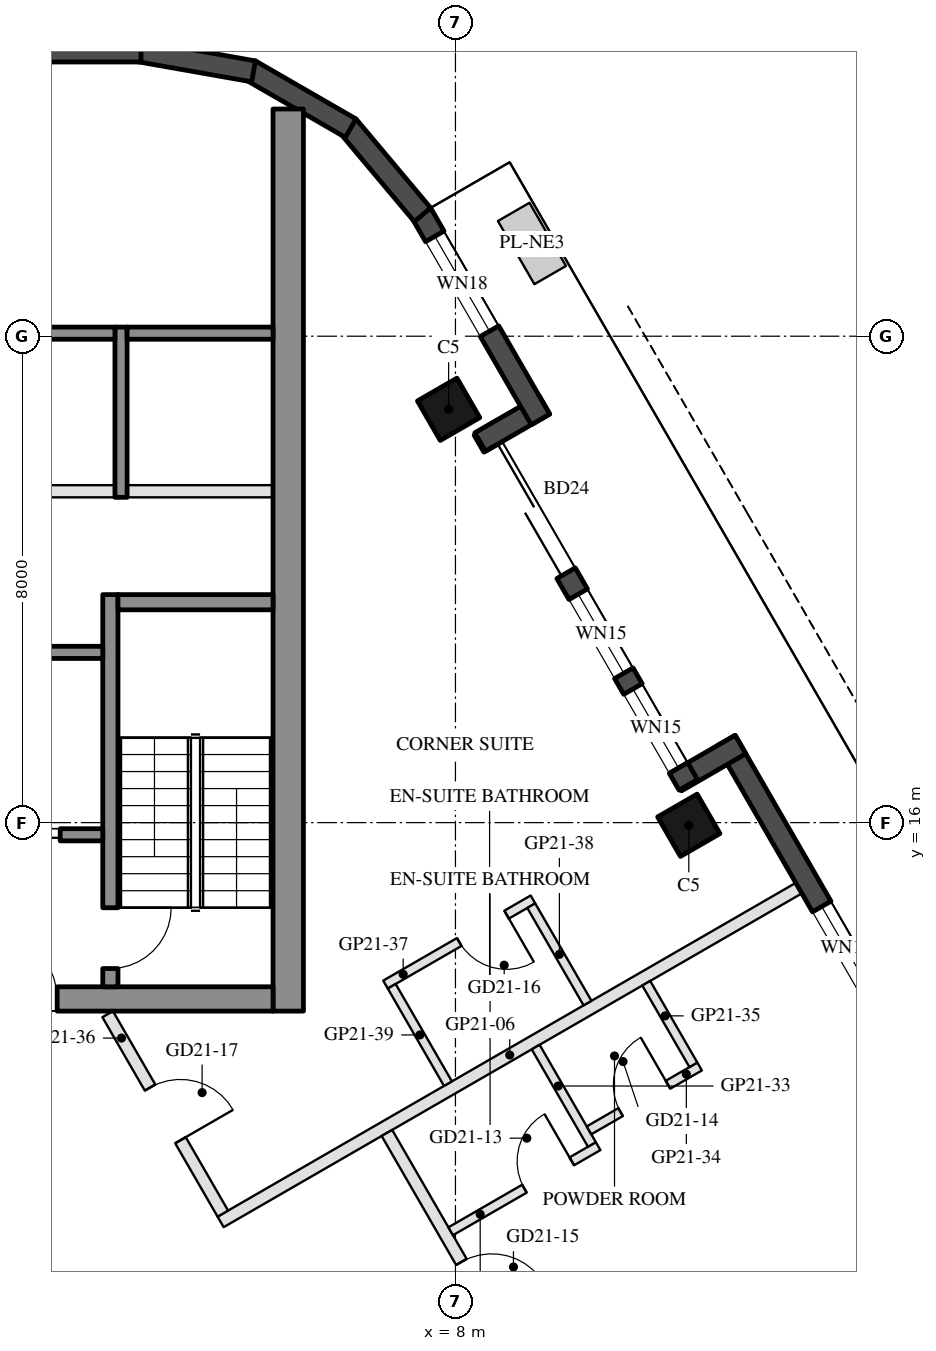
"""IFC4 building model, lengths in metres.
Left out: names, types, materials, properties, quantities, classifications, styles, units other than length and angle.
Written with IfcOpenShell. Run it as: python <this file> out.ifc"""

import sys

from ifc_helpers import new_model, si_unit, direction, frame, frame_2d, origin, origin_2d, place, context, subcontext, project, spatial, rectangle, hollow_rectangle, extrude, element, fill, save


model = new_model("IFC4")
c1 = context("Model", 3, precision=1e-05, world=origin(), true_north=direction((0.0, 1.0)))
c2 = subcontext(c1, "Body", "Model", "MODEL_VIEW")
j1 = project(units=[si_unit("LENGTHUNIT", "METRE"), si_unit("PLANEANGLEUNIT", "RADIAN")], contexts=[c1])
p1 = place(None, origin())
s1 = spatial("IfcSite", under=j1, at=p1, CompositionType="ELEMENT")
p2 = place(p1, origin())
s2 = spatial("IfcBuilding", under=s1, at=p2, CompositionType="ELEMENT")
p3 = place(p2, frame((0.0, 0.0, 220.6)))
s3 = spatial("IfcBuildingStorey", under=s2, at=p3, CompositionType="ELEMENT", Elevation=220.6)
for number, where, z_axis, x_axis in (
    (1, (11.838, 15.957, 0.0), (0.0, 0.0, 1.0), (-0.5, 0.866, 0.0)),
    (2, (7.888, 22.798, 0.0), (0.0, 0.0, 1.0), (-0.5, 0.866, 0.0)),
):
    element("IfcColumn", number, at=place(p3, frame(where, z_axis=z_axis, x_axis=x_axis)), inside=s3, PredefinedType="COLUMN", context=c2, shape_type="SweptSolid", body=[
        extrude(hollow_rectangle(XDim=0.75, YDim=0.75, WallThickness=0.035, at=origin_2d()), origin(), (0.0, 0.0, 1.0), 3.7),
    ])
p4 = place(p3, frame((17.299, 8.948, 0.0), z_axis=(0.0, 0.0, 1.0), x_axis=(-0.500010041276, 0.866019606374, 0.0)))
e3 = element("IfcWall", 3, at=p4, inside=s3, PredefinedType="SOLIDWALL", context=c2, shape_type="SweptSolid", body=[
    extrude(rectangle(XDim=9.7, YDim=0.35, at=frame_2d((4.85, 0.0))), origin(), (0.0, 0.0, 1.0), 3.55),
])
p5 = place(p4, frame((1.625, 0.0, 0.3)))
e4 = element("IfcOpeningElement", 4, at=p5, cuts=e3, PredefinedType="OPENING", context=c2, shape_type="SweptSolid", body=[
    extrude(rectangle(XDim=2.6, YDim=2.65, at=frame_2d((1.3, 1.325))), frame((0.0, 0.185, 0.0), z_axis=(0.0, -1.0, 0.0), x_axis=(1.0, 0.0, 0.0)), (0.0, 0.0, 1.0), 0.37),
])
p6 = place(p4, frame((4.949, 0.0, 0.3)))
e5 = element("IfcOpeningElement", 5, at=p6, cuts=e3, PredefinedType="OPENING", context=c2, shape_type="SweptSolid", body=[
    extrude(rectangle(XDim=1.6, YDim=2.65, at=frame_2d((0.8, 1.325))), frame((0.0, 0.185, 0.0), z_axis=(0.0, -1.0, 0.0), x_axis=(1.0, 0.0, 0.0)), (0.0, 0.0, 1.0), 0.37),
])
p7 = place(p3, frame((12.688, 17.284, 0.0), z_axis=(0.0, 0.0, 1.0), x_axis=(-0.865955602162, -0.500120880472, 0.0)))
e6 = element("IfcWall", 6, at=p7, inside=s3, PredefinedType="SOLIDWALL", context=c2, shape_type="SweptSolid", body=[
    extrude(rectangle(XDim=1.22, YDim=0.35, at=frame_2d((0.61, 0.0))), origin(), (0.0, 0.0, 1.0), 3.55),
])
p8 = place(p3, frame((11.829, 16.621, 0.0), z_axis=(0.0, 0.0, 1.0), x_axis=(-0.500003597184, 0.866023326939, 0.0)))
e7 = element("IfcWall", 7, at=p8, inside=s3, PredefinedType="SOLIDWALL", context=c2, shape_type="SweptSolid", body=[
    extrude(rectangle(XDim=6.74, YDim=0.35, at=frame_2d((3.37, 0.0))), origin(), (0.0, 0.0, 1.0), 3.55),
])
p9 = place(p8, frame((4.02, 0.0, 0.0)))
e8 = element("IfcOpeningElement", 8, at=p9, cuts=e7, PredefinedType="OPENING", context=c2, shape_type="SweptSolid", body=[
    extrude(rectangle(XDim=2.4, YDim=2.4, at=frame_2d((1.2, 1.2))), frame((0.0, 0.185, 0.0), z_axis=(0.0, -1.0, 0.0), x_axis=(1.0, 0.0, 0.0)), (0.0, 0.0, 1.0), 0.37),
])
p10 = place(p8, frame((0.32, 0.0, 0.3)))
e9 = element("IfcOpeningElement", 9, at=p10, cuts=e7, PredefinedType="OPENING", context=c2, shape_type="SweptSolid", body=[
    extrude(rectangle(XDim=1.5, YDim=2.65, at=frame_2d((0.75, 1.325))), frame((0.0, 0.185, 0.0), z_axis=(0.0, -1.0, 0.0), x_axis=(1.0, 0.0, 0.0)), (0.0, 0.0, 1.0), 0.37),
])
p11 = place(p8, frame((2.12, 0.0, 0.3)))
e10 = element("IfcOpeningElement", 10, at=p11, cuts=e7, PredefinedType="OPENING", context=c2, shape_type="SweptSolid", body=[
    extrude(rectangle(XDim=1.5, YDim=2.65, at=frame_2d((0.75, 1.325))), frame((0.0, 0.185, 0.0), z_axis=(0.0, -1.0, 0.0), x_axis=(1.0, 0.0, 0.0)), (0.0, 0.0, 1.0), 0.37),
])
p12 = place(p3, frame((8.406, 22.26, 0.0), z_axis=(0.0, 0.0, 1.0), x_axis=(0.865955602162, 0.500120880472, 0.0)))
e11 = element("IfcWall", 11, at=p12, inside=s3, PredefinedType="SOLIDWALL", context=c2, shape_type="SweptSolid", body=[
    extrude(rectangle(XDim=1.22, YDim=0.35, at=frame_2d((0.61, 0.0))), origin(), (0.0, 0.0, 1.0), 3.55),
])
p13 = place(p3, frame((9.398, 22.631, 0.0), z_axis=(0.0, 0.0, 1.0), x_axis=(-0.499954521343, 0.866051659307, 0.0)))
e12 = element("IfcWall", 12, at=p13, inside=s3, PredefinedType="SOLIDWALL", context=c2, shape_type="SweptSolid", body=[
    extrude(rectangle(XDim=3.916, YDim=0.35, at=frame_2d((1.958, 0.0))), origin(), (0.0, 0.0, 1.0), 3.55),
])
p14 = place(p13, frame((1.676, 0.0, 0.3)))
e13 = element("IfcOpeningElement", 13, at=p14, cuts=e12, PredefinedType="OPENING", context=c2, shape_type="SweptSolid", body=[
    extrude(rectangle(XDim=1.8, YDim=2.65, at=frame_2d((0.9, 1.325))), frame((0.0, 0.185, 0.0), z_axis=(0.0, -1.0, 0.0), x_axis=(1.0, 0.0, 0.0)), (0.0, 0.0, 1.0), 0.37),
])
p15 = place(p3, frame((7.458, 25.998, 0.0), z_axis=(0.0, 0.0, 1.0), x_axis=(-0.642808304945, 0.766027077259, 0.0)))
e14 = element("IfcWall", 14, at=p15, inside=s3, PredefinedType="SOLIDWALL", context=c2, shape_type="SweptSolid", body=[
    extrude(rectangle(XDim=1.91, YDim=0.35, at=frame_2d((0.955, 0.0))), origin(), (0.0, 0.0, 1.0), 3.55),
])
for number, where, z_axis, x_axis in (
    (15, (6.277, 27.422, 0.0), (0.0, 0.0, 1.0), (-0.866, 0.5, 0.0)),
    (16, (4.68, 28.356, 0.0), (0.0, 0.0, 1.0), (-0.985, 0.174, 0.0)),
):
    element("IfcWall", number, at=place(p3, frame(where, z_axis=z_axis, x_axis=x_axis)), inside=s3, PredefinedType="SOLIDWALL", context=c2, shape_type="SweptSolid", body=[
        extrude(rectangle(XDim=1.91, YDim=0.35, at=frame_2d((0.955, 0.0))), origin(), (0.0, 0.0, 1.0), 3.55),
    ])
p16 = place(p3, frame((2.829, 28.685, 0.0), z_axis=(0.0, 0.0, 1.0), x_axis=(-1.0, 0.0, 0.0)))
e17 = element("IfcWall", 17, at=p16, inside=s3, PredefinedType="SOLIDWALL", context=c2, shape_type="SweptSolid", body=[
    extrude(rectangle(XDim=5.658, YDim=0.35, at=frame_2d((2.829, 0.0))), origin(), (0.0, 0.0, 1.0), 3.55),
])
p17 = place(p3, frame((5.25, 12.9, 0.0), z_axis=(0.0, 0.0, 1.0), x_axis=(0.0, 1.0, 0.0)))
e18 = element("IfcWall", 18, at=p17, inside=s3, PredefinedType="SHEAR", context=c2, shape_type="SweptSolid", body=[
    extrude(rectangle(XDim=14.837, YDim=0.5, at=frame_2d((7.418, 0.0))), origin(), (0.0, 0.0, 1.0), 3.5),
])
p18 = place(p3, frame((5.0, 13.1, 0.0), z_axis=(0.0, 0.0, 1.0), x_axis=(-1.0, 0.0, 0.0)))
e19 = element("IfcWall", 19, at=p18, inside=s3, PredefinedType="SHEAR", context=c2, shape_type="SweptSolid", body=[
    extrude(rectangle(XDim=10.0, YDim=0.4, at=frame_2d((5.0, 0.0))), origin(), (0.0, 0.0, 1.0), 3.5),
])
p19 = place(p18, frame((3.55, 0.0, 0.0)))
e20 = element("IfcOpeningElement", 20, at=p19, cuts=e19, PredefinedType="OPENING", context=c2, shape_type="SweptSolid", body=[
    extrude(rectangle(XDim=1.1, YDim=2.1, at=frame_2d((0.55, 1.05))), frame((0.0, 0.21, 0.0), z_axis=(0.0, -1.0, 0.0), x_axis=(1.0, 0.0, 0.0)), (0.0, 0.0, 1.0), 0.42),
])
p20 = place(p18, frame((5.85, 0.0, 0.0)))
e21 = element("IfcOpeningElement", 21, at=p20, cuts=e19, PredefinedType="OPENING", context=c2, shape_type="SweptSolid", body=[
    extrude(rectangle(XDim=1.4, YDim=2.1, at=frame_2d((0.7, 1.05))), frame((0.0, 0.21, 0.0), z_axis=(0.0, -1.0, 0.0), x_axis=(1.0, 0.0, 0.0)), (0.0, 0.0, 1.0), 0.42),
])
p21 = place(p3, frame((2.325, 13.3, 0.0), z_axis=(0.0, 0.0, 1.0), x_axis=(0.0, 1.0, 0.0)))
e22 = element("IfcWall", 22, at=p21, inside=s3, PredefinedType="SHEAR", context=c2, shape_type="SweptSolid", body=[
    extrude(rectangle(XDim=6.45, YDim=0.25, at=frame_2d((3.225, 0.0))), origin(), (0.0, 0.0, 1.0), 3.5),
])
p22 = place(p21, frame((0.3, 0.0, 0.0)))
e23 = element("IfcOpeningElement", 23, at=p22, cuts=e22, PredefinedType="OPENING", context=c2, shape_type="SweptSolid", body=[
    extrude(rectangle(XDim=1.0, YDim=2.1, at=frame_2d((0.5, 1.05))), frame((0.0, 0.135, 0.0), z_axis=(0.0, -1.0, 0.0), x_axis=(1.0, 0.0, 0.0)), (0.0, 0.0, 1.0), 0.27),
])
p23 = place(p3, frame((5.0, 19.625, 0.0), z_axis=(0.0, 0.0, 1.0), x_axis=(-1.0, 0.0, 0.0)))
e24 = element("IfcWall", 24, at=p23, inside=s3, PredefinedType="SHEAR", context=c2, shape_type="SweptSolid", body=[
    extrude(rectangle(XDim=2.55, YDim=0.25, at=frame_2d((1.275, 0.0))), origin(), (0.0, 0.0, 1.0), 3.5),
])
p24 = place(p3, frame((2.2, 18.8, 0.0), z_axis=(0.0, 0.0, 1.0), x_axis=(-1.0, 0.0, 0.0)))
e25 = element("IfcWall", 25, at=p24, inside=s3, PredefinedType="SHEAR", context=c2, shape_type="SweptSolid", body=[
    extrude(rectangle(XDim=2.8, YDim=0.2, at=frame_2d((1.4, 0.0))), origin(), (0.0, 0.0, 1.0), 3.5),
])
p25 = place(p3, frame((2.2, 15.8, 0.0), z_axis=(0.0, 0.0, 1.0), x_axis=(-1.0, 0.0, 0.0)))
e26 = element("IfcWall", 26, at=p25, inside=s3, PredefinedType="SHEAR", context=c2, shape_type="SweptSolid", body=[
    extrude(rectangle(XDim=2.8, YDim=0.2, at=frame_2d((1.4, 0.0))), origin(), (0.0, 0.0, 1.0), 3.5),
])
p26 = place(p25, frame((0.7, 0.0, 0.0)))
e27 = element("IfcOpeningElement", 27, at=p26, cuts=e26, PredefinedType="OPENING", context=c2, shape_type="SweptSolid", body=[
    extrude(rectangle(XDim=1.2, YDim=2.1, at=frame_2d((0.6, 1.05))), frame((0.0, 0.11, 0.0), z_axis=(0.0, -1.0, 0.0), x_axis=(1.0, 0.0, 0.0)), (0.0, 0.0, 1.0), 0.22),
])
p27 = place(p3, frame((2.5, 21.35, 0.0), z_axis=(0.0, 0.0, 1.0), x_axis=(0.0, 1.0, 0.0)))
e28 = element("IfcWall", 28, at=p27, inside=s3, PredefinedType="SHEAR", context=c2, shape_type="SweptSolid", body=[
    extrude(rectangle(XDim=2.8, YDim=0.2, at=frame_2d((1.4, 0.0))), origin(), (0.0, 0.0, 1.0), 3.5),
])
p28 = place(p3, frame((5.0, 24.05, 0.0), z_axis=(0.0, 0.0, 1.0), x_axis=(-1.0, 0.0, 0.0)))
e29 = element("IfcWall", 29, at=p28, inside=s3, PredefinedType="SHEAR", context=c2, shape_type="SweptSolid", body=[
    extrude(rectangle(XDim=2.4, YDim=0.2, at=frame_2d((1.2, 0.0))), origin(), (0.0, 0.0, 1.0), 3.5),
])
p29 = place(p3, frame((2.4, 24.05, 0.0), z_axis=(0.0, 0.0, 1.0), x_axis=(-1.0, 0.0, 0.0)))
e30 = element("IfcWall", 30, at=p29, inside=s3, PredefinedType="SHEAR", context=c2, shape_type="SweptSolid", body=[
    extrude(rectangle(XDim=2.8, YDim=0.2, at=frame_2d((1.4, 0.0))), origin(), (0.0, 0.0, 1.0), 3.5),
])
p30 = place(p3, frame((5.0, 21.45, 0.0), z_axis=(0.0, 0.0, 1.0), x_axis=(-1.0, 0.0, 0.0)))
e31 = element("IfcWall", 31, at=p30, inside=s3, PredefinedType="PARTITIONING", context=c2, shape_type="SweptSolid", body=[
    extrude(rectangle(XDim=2.4, YDim=0.2, at=frame_2d((1.2, 0.0))), origin(), (0.0, 0.0, 1.0), 3.5),
])
p31 = place(p3, frame((2.4, 21.45, 0.0), z_axis=(0.0, 0.0, 1.0), x_axis=(-1.0, 0.0, 0.0)))
e32 = element("IfcWall", 32, at=p31, inside=s3, PredefinedType="PARTITIONING", context=c2, shape_type="SweptSolid", body=[
    extrude(rectangle(XDim=2.8, YDim=0.2, at=frame_2d((1.4, 0.0))), origin(), (0.0, 0.0, 1.0), 3.5),
])
p32 = place(p3, frame((13.647, 14.923, 0.0), z_axis=(0.0, 0.0, 1.0), x_axis=(-0.866027479907, -0.499996404033, 0.0)))
e33 = element("IfcWall", 33, at=p32, inside=s3, PredefinedType="PARTITIONING", context=c2, shape_type="SweptSolid", body=[
    extrude(rectangle(XDim=10.98, YDim=0.2, at=frame_2d((5.49, 0.0))), origin(), (0.0, 0.0, 1.0), 3.06),
])
p33 = place(p3, frame((6.873, 10.896, 0.0), z_axis=(0.0, 0.0, 1.0), x_axis=(0.499996545922, -0.866027397988, 0.0)))
e34 = element("IfcWall", 34, at=p33, inside=s3, PredefinedType="PARTITIONING", context=c2, shape_type="SweptSolid", body=[
    extrude(rectangle(XDim=11.0, YDim=0.2, at=frame_2d((5.5, 0.0))), origin(), (0.0, 0.0, 1.0), 2.95),
])
p34 = place(p33, frame((2.45, 0.0, 0.0)))
e35 = element("IfcOpeningElement", 35, at=p34, cuts=e34, PredefinedType="OPENING", context=c2, shape_type="SweptSolid", body=[
    extrude(rectangle(XDim=1.0, YDim=2.1, at=frame_2d((0.5, 1.05))), frame((0.0, 0.11, 0.0), z_axis=(0.0, -1.0, 0.0), x_axis=(1.0, 0.0, 0.0)), (0.0, 0.0, 1.0), 0.22),
])
p35 = place(p3, frame((7.922, 9.279, 0.0), z_axis=(0.0, 0.0, 1.0), x_axis=(0.865996816683, 0.500049511043, 0.0)))
e36 = element("IfcWall", 36, at=p35, inside=s3, PredefinedType="PARTITIONING", context=c2, shape_type="SweptSolid", body=[
    extrude(rectangle(XDim=2.8, YDim=0.15, at=frame_2d((1.4, 0.0))), origin(), (0.0, 0.0, 1.0), 2.95),
])
p36 = place(p35, frame((1.4, 0.0, 0.0)))
e37 = element("IfcOpeningElement", 37, at=p36, cuts=e36, PredefinedType="OPENING", context=c2, shape_type="SweptSolid", body=[
    extrude(rectangle(XDim=0.9, YDim=2.1, at=frame_2d((0.45, 1.05))), frame((0.0, 0.085, 0.0), z_axis=(0.0, -1.0, 0.0), x_axis=(1.0, 0.0, 0.0)), (0.0, 0.0, 1.0), 0.17),
])
p37 = place(p3, frame((10.244, 10.707, 0.0), z_axis=(0.0, 0.0, 1.0), x_axis=(-0.500042316284, 0.866000971088, 0.0)))
e38 = element("IfcWall", 38, at=p37, inside=s3, PredefinedType="PARTITIONING", context=c2, shape_type="SweptSolid", body=[
    extrude(rectangle(XDim=1.85, YDim=0.15, at=frame_2d((0.925, 0.0))), origin(), (0.0, 0.0, 1.0), 3.55),
])
p38 = place(p3, frame((10.197, 10.939, 0.0), z_axis=(0.0, 0.0, 1.0), x_axis=(0.866009402589, 0.500027713859, 0.0)))
e39 = element("IfcWall", 39, at=p38, inside=s3, PredefinedType="PARTITIONING", context=c2, shape_type="SweptSolid", body=[
    extrude(rectangle(XDim=2.1, YDim=0.15, at=frame_2d((1.05, 0.0))), origin(), (0.0, 0.0, 1.0), 3.55),
])
p39 = place(p38, frame((0.6, 0.0, 0.0)))
e40 = element("IfcOpeningElement", 40, at=p39, cuts=e39, PredefinedType="OPENING", context=c2, shape_type="SweptSolid", body=[
    extrude(rectangle(XDim=0.9, YDim=2.1, at=frame_2d((0.45, 1.05))), frame((0.0, 0.085, 0.0), z_axis=(0.0, -1.0, 0.0), x_axis=(1.0, 0.0, 0.0)), (0.0, 0.0, 1.0), 0.17),
])
p40 = place(p3, frame((11.913, 12.016, 0.0), z_axis=(0.0, 0.0, 1.0), x_axis=(-0.499967891604, 0.866043940782, 0.0)))
e41 = element("IfcWall", 41, at=p40, inside=s3, PredefinedType="PARTITIONING", context=c2, shape_type="SweptSolid", body=[
    extrude(rectangle(XDim=1.55, YDim=0.15, at=frame_2d((0.775, 0.0))), origin(), (0.0, 0.0, 1.0), 3.55),
])
p41 = place(p3, frame((2.281, 12.85, 0.0), z_axis=(0.0, 0.0, 1.0), x_axis=(0.499979074716, -0.866037484666, 0.0)))
e42 = element("IfcWall", 42, at=p41, inside=s3, PredefinedType="PARTITIONING", context=c2, shape_type="SweptSolid", body=[
    extrude(rectangle(XDim=3.788, YDim=0.2, at=frame_2d((1.894, 0.0))), origin(), (0.0, 0.0, 1.0), 2.95),
])
p42 = place(p41, frame((1.394, 0.0, 0.0)))
e43 = element("IfcOpeningElement", 43, at=p42, cuts=e42, PredefinedType="OPENING", context=c2, shape_type="SweptSolid", body=[
    extrude(rectangle(XDim=1.0, YDim=2.1, at=frame_2d((0.5, 1.05))), frame((0.0, 0.11, 0.0), z_axis=(0.0, -1.0, 0.0), x_axis=(1.0, 0.0, 0.0)), (0.0, 0.0, 1.0), 0.22),
])
p43 = place(p3, frame((9.274, 14.737, 0.0), z_axis=(0.0, 0.0, 1.0), x_axis=(-0.866018616679, -0.500011755427, 0.0)))
e44 = element("IfcWall", 44, at=p43, inside=s3, PredefinedType="PARTITIONING", context=c2, shape_type="SweptSolid", body=[
    extrude(rectangle(XDim=2.8, YDim=0.15, at=frame_2d((1.4, 0.0))), origin(), (0.0, 0.0, 1.0), 3.55),
])
p44 = place(p43, frame((0.5, 0.0, 0.0)))
e45 = element("IfcOpeningElement", 45, at=p44, cuts=e44, PredefinedType="OPENING", context=c2, shape_type="SweptSolid", body=[
    extrude(rectangle(XDim=0.9, YDim=2.1, at=frame_2d((0.45, 1.05))), frame((0.0, 0.085, 0.0), z_axis=(0.0, -1.0, 0.0), x_axis=(1.0, 0.0, 0.0)), (0.0, 0.0, 1.0), 0.17),
])
p45 = place(p3, frame((10.172, 13.032, 0.0), z_axis=(0.0, 0.0, 1.0), x_axis=(-0.500042316284, 0.866000971088, 0.0)))
e46 = element("IfcWall", 46, at=p45, inside=s3, PredefinedType="PARTITIONING", context=c2, shape_type="SweptSolid", body=[
    extrude(rectangle(XDim=1.85, YDim=0.15, at=frame_2d((0.925, 0.0))), origin(), (0.0, 0.0, 1.0), 2.95),
])
p46 = place(p3, frame((7.877, 11.707, 0.0), z_axis=(0.0, 0.0, 1.0), x_axis=(-0.499985172903, 0.866033964044, 0.0)))
e47 = element("IfcWall", 47, at=p46, inside=s3, PredefinedType="PARTITIONING", context=c2, shape_type="SweptSolid", body=[
    extrude(rectangle(XDim=1.85, YDim=0.15, at=frame_2d((0.925, 0.0))), origin(), (0.0, 0.0, 1.0), 2.95),
])
p47 = place(p6, origin())
e48 = element("IfcWindow", 48, at=p47, inside=s3, PartitioningType="SINGLE_PANEL", PredefinedType="WINDOW", context=c2, shape_type="SweptSolid", body=[
    extrude(rectangle(XDim=1.6, YDim=2.65, at=frame_2d((0.8, 1.325))), frame((0.0, 0.03, 0.0), z_axis=(0.0, -1.0, 0.0), x_axis=(1.0, 0.0, 0.0)), (0.0, 0.0, 1.0), 0.06),
])
fill(e5, e48)
p48 = place(p9, frame((2.4, 0.0, 0.0), z_axis=(0.0, 0.0, 1.0), x_axis=(-1.0, 0.0, 0.0)))
e49 = element("IfcDoor", 49, at=p48, inside=s3, OperationType="SLIDING_TO_LEFT", PredefinedType="DOOR", context=c2, shape_type="SweptSolid", body=[
    extrude(rectangle(XDim=2.4, YDim=2.4, at=frame_2d((1.2, 1.2))), frame((0.0, 0.025, 0.0), z_axis=(0.0, -1.0, 0.0), x_axis=(1.0, 0.0, 0.0)), (0.0, 0.0, 1.0), 0.05),
])
fill(e8, e49)
p49 = place(p10, origin())
e50 = element("IfcWindow", 50, at=p49, inside=s3, PartitioningType="SINGLE_PANEL", PredefinedType="WINDOW", context=c2, shape_type="SweptSolid", body=[
    extrude(rectangle(XDim=1.5, YDim=2.65, at=frame_2d((0.75, 1.325))), frame((0.0, 0.03, 0.0), z_axis=(0.0, -1.0, 0.0), x_axis=(1.0, 0.0, 0.0)), (0.0, 0.0, 1.0), 0.06),
])
fill(e9, e50)
p50 = place(p11, origin())
e51 = element("IfcWindow", 51, at=p50, inside=s3, PartitioningType="SINGLE_PANEL", PredefinedType="WINDOW", context=c2, shape_type="SweptSolid", body=[
    extrude(rectangle(XDim=1.5, YDim=2.65, at=frame_2d((0.75, 1.325))), frame((0.0, 0.03, 0.0), z_axis=(0.0, -1.0, 0.0), x_axis=(1.0, 0.0, 0.0)), (0.0, 0.0, 1.0), 0.06),
])
fill(e10, e51)
p51 = place(p14, origin())
e52 = element("IfcWindow", 52, at=p51, inside=s3, PartitioningType="SINGLE_PANEL", PredefinedType="WINDOW", context=c2, shape_type="SweptSolid", body=[
    extrude(rectangle(XDim=1.8, YDim=2.65, at=frame_2d((0.9, 1.325))), frame((0.0, 0.03, 0.0), z_axis=(0.0, -1.0, 0.0), x_axis=(1.0, 0.0, 0.0)), (0.0, 0.0, 1.0), 0.06),
])
fill(e13, e52)
p52 = place(p26, origin())
e53 = element("IfcDoor", 53, at=p52, inside=s3, OperationType="DOUBLE_DOOR_SLIDING", PredefinedType="DOOR", context=c2, shape_type="SweptSolid", body=[
    extrude(rectangle(XDim=1.2, YDim=2.1, at=frame_2d((0.6, 1.05))), frame((0.0, 0.025, 0.0), z_axis=(0.0, -1.0, 0.0), x_axis=(1.0, 0.0, 0.0)), (0.0, 0.0, 1.0), 0.05),
])
fill(e27, e53)
p53 = place(p19, frame((1.1, 0.0, 0.0), z_axis=(0.0, 0.0, 1.0), x_axis=(-1.0, 0.0, 0.0)))
e54 = element("IfcDoor", 54, at=p53, inside=s3, OperationType="SINGLE_SWING_LEFT", PredefinedType="DOOR", context=c2, shape_type="SweptSolid", body=[
    extrude(rectangle(XDim=1.1, YDim=2.1, at=frame_2d((0.55, 1.05))), frame((0.0, 0.025, 0.0), z_axis=(0.0, -1.0, 0.0), x_axis=(1.0, 0.0, 0.0)), (0.0, 0.0, 1.0), 0.05),
])
fill(e20, e54)
p54 = place(p22, frame((1.0, 0.0, 0.0), z_axis=(0.0, 0.0, 1.0), x_axis=(-1.0, 0.0, 0.0)))
e55 = element("IfcDoor", 55, at=p54, inside=s3, OperationType="SINGLE_SWING_LEFT", PredefinedType="DOOR", context=c2, shape_type="SweptSolid", body=[
    extrude(rectangle(XDim=1.0, YDim=2.1, at=frame_2d((0.5, 1.05))), frame((0.0, 0.025, 0.0), z_axis=(0.0, -1.0, 0.0), x_axis=(1.0, 0.0, 0.0)), (0.0, 0.0, 1.0), 0.05),
])
fill(e23, e55)
p55 = place(p36, origin())
e56 = element("IfcDoor", 56, at=p55, inside=s3, OperationType="SINGLE_SWING_RIGHT", PredefinedType="DOOR", context=c2, shape_type="SweptSolid", body=[
    extrude(rectangle(XDim=0.9, YDim=2.1, at=frame_2d((0.45, 1.05))), frame((0.0, 0.025, 0.0), z_axis=(0.0, -1.0, 0.0), x_axis=(1.0, 0.0, 0.0)), (0.0, 0.0, 1.0), 0.05),
])
fill(e37, e56)
p56 = place(p39, origin())
e57 = element("IfcDoor", 57, at=p56, inside=s3, OperationType="SINGLE_SWING_RIGHT", PredefinedType="DOOR", context=c2, shape_type="SweptSolid", body=[
    extrude(rectangle(XDim=0.9, YDim=2.1, at=frame_2d((0.45, 1.05))), frame((0.0, 0.025, 0.0), z_axis=(0.0, -1.0, 0.0), x_axis=(1.0, 0.0, 0.0)), (0.0, 0.0, 1.0), 0.05),
])
fill(e40, e57)
p57 = place(p34, origin())
e58 = element("IfcDoor", 58, at=p57, inside=s3, OperationType="SINGLE_SWING_RIGHT", PredefinedType="DOOR", context=c2, shape_type="SweptSolid", body=[
    extrude(rectangle(XDim=1.0, YDim=2.1, at=frame_2d((0.5, 1.05))), frame((0.0, 0.025, 0.0), z_axis=(0.0, -1.0, 0.0), x_axis=(1.0, 0.0, 0.0)), (0.0, 0.0, 1.0), 0.05),
])
fill(e35, e58)
p58 = place(p44, origin())
e59 = element("IfcDoor", 59, at=p58, inside=s3, OperationType="SINGLE_SWING_LEFT", PredefinedType="DOOR", context=c2, shape_type="SweptSolid", body=[
    extrude(rectangle(XDim=0.9, YDim=2.1, at=frame_2d((0.45, 1.05))), frame((0.0, 0.025, 0.0), z_axis=(0.0, -1.0, 0.0), x_axis=(1.0, 0.0, 0.0)), (0.0, 0.0, 1.0), 0.05),
])
fill(e45, e59)
p59 = place(p42, origin())
e60 = element("IfcDoor", 60, at=p59, inside=s3, OperationType="SINGLE_SWING_RIGHT", PredefinedType="DOOR", context=c2, shape_type="SweptSolid", body=[
    extrude(rectangle(XDim=1.0, YDim=2.1, at=frame_2d((0.5, 1.05))), frame((0.0, 0.025, 0.0), z_axis=(0.0, -1.0, 0.0), x_axis=(1.0, 0.0, 0.0)), (0.0, 0.0, 1.0), 0.05),
])
fill(e43, e60)
save(model, sys.argv[1])
